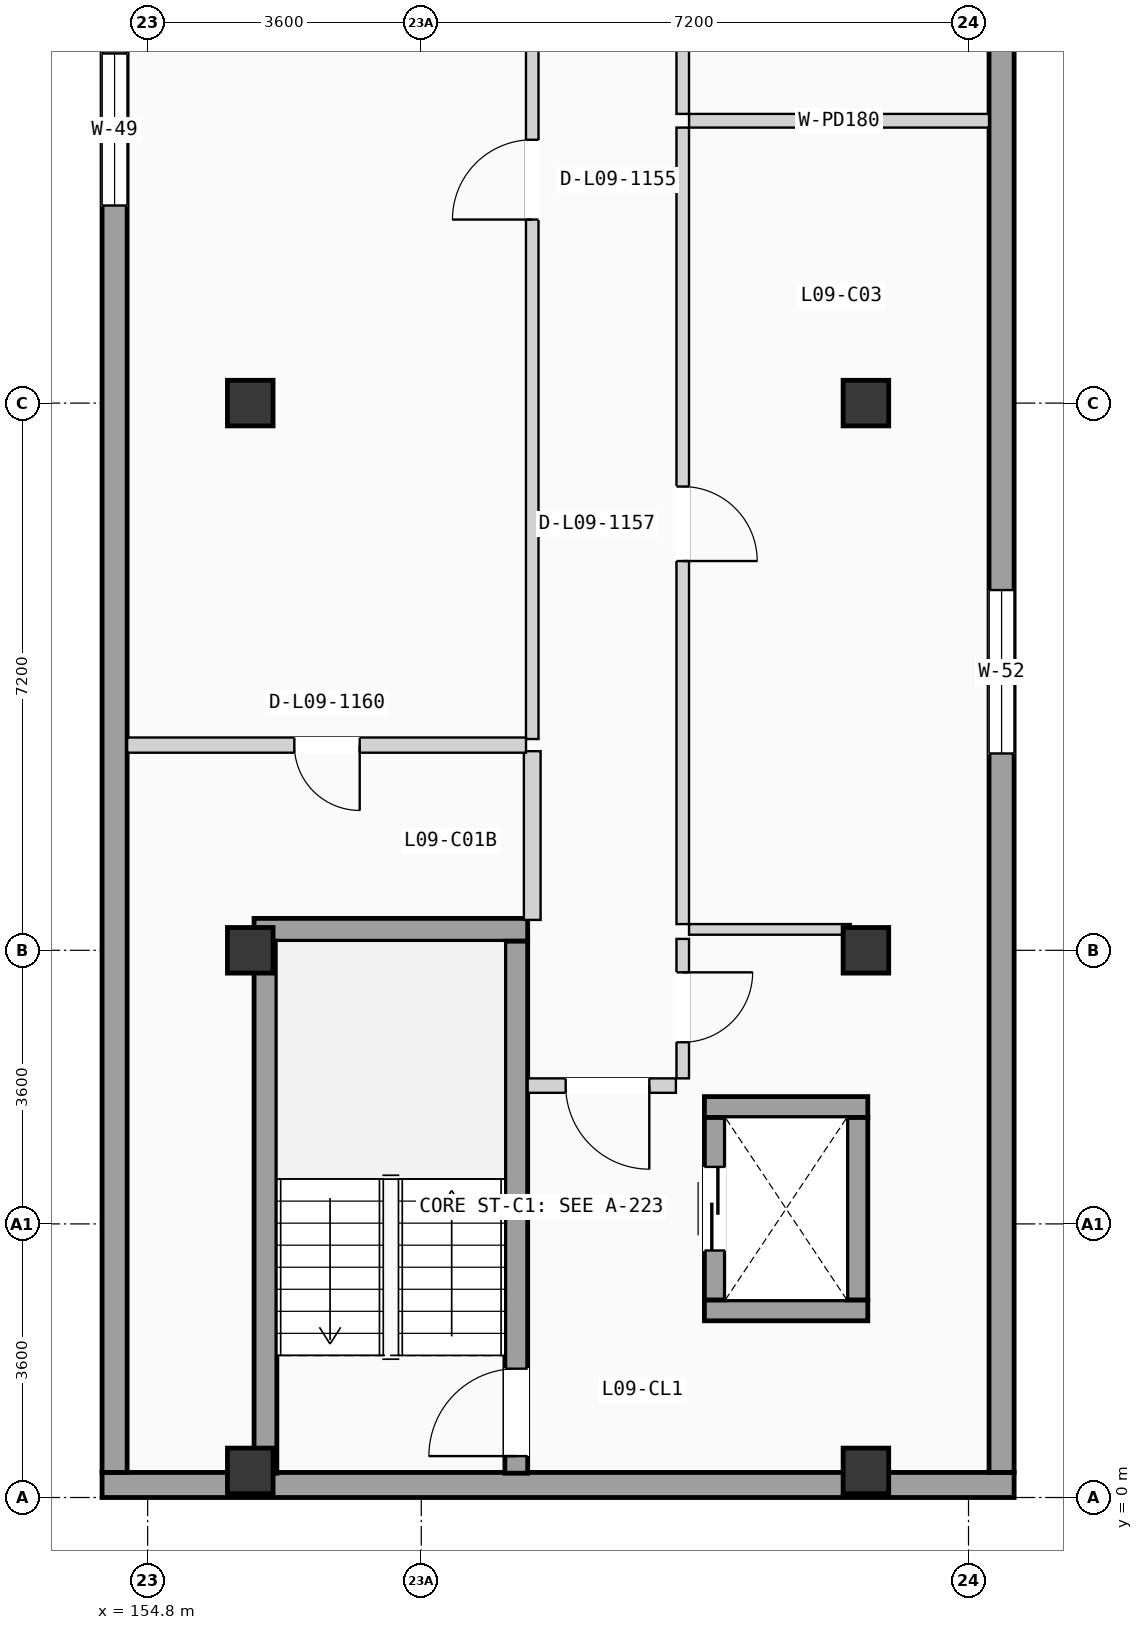
"""IFC4 building model, lengths in metres.
Left out: names, types, materials, properties, quantities, classifications, styles, units other than length and angle.
Written with IfcOpenShell. Run it as: python <this file> out.ifc"""

import sys

from ifc_helpers import new_model, si_unit, direction, frame, frame_2d, origin, origin_2d, place, context, subcontext, project, spatial, rectangle, extrude, element, fill, save


model = new_model("IFC4")
c1 = context("Model", 3, precision=1e-05, world=origin(), true_north=direction((0.0, 1.0)))
c2 = subcontext(c1, "Body", "Model", "MODEL_VIEW")
j1 = project(units=[si_unit("LENGTHUNIT", "METRE"), si_unit("PLANEANGLEUNIT", "RADIAN")], contexts=[c1])
p1 = place(None, origin())
s1 = spatial("IfcSite", under=j1, at=p1, CompositionType="ELEMENT")
p2 = place(p1, origin())
s2 = spatial("IfcBuilding", under=s1, at=p2, CompositionType="ELEMENT")
p3 = place(p2, frame((0.0, 0.0, 30.975)))
s3 = spatial("IfcBuildingStorey", under=s2, at=p3, CompositionType="ELEMENT", Elevation=30.975)
for number, where, z_axis, x_axis in (
    (1, (156.15, 0.35, 0.0), (0.0, 0.0, 1.0), (1.0, 0.0, 0.0)),
    (2, (156.15, 7.2, 0.0), (0.0, 0.0, 1.0), (1.0, 0.0, 0.0)),
    (3, (156.15, 14.4, 0.0), (0.0, 0.0, 1.0), (1.0, 0.0, 0.0)),
    (4, (164.25, 0.35, 0.0), (0.0, 0.0, 1.0), (1.0, 0.0, 0.0)),
    (5, (164.25, 7.2, 0.0), (0.0, 0.0, 1.0), (1.0, 0.0, 0.0)),
    (6, (164.25, 14.4, 0.0), (0.0, 0.0, 1.0), (1.0, 0.0, 0.0)),
):
    element("IfcColumn", number, at=place(p3, frame(where, z_axis=z_axis, x_axis=x_axis)), inside=s3, PredefinedType="COLUMN", context=c2, shape_type="SweptSolid", body=[
        extrude(rectangle(XDim=0.6, YDim=0.6, at=origin_2d()), origin(), (0.0, 0.0, 1.0), 3.15),
    ])
p4 = place(p3, frame((154.2, 0.165, 0.0), z_axis=(0.0, 0.0, 1.0), x_axis=(1.0, 0.0, 0.0)))
e7 = element("IfcWall", 7, at=p4, inside=s3, PredefinedType="SOLIDWALL", context=c2, shape_type="SweptSolid", body=[
    extrude(rectangle(XDim=12.0, YDim=0.33, at=frame_2d((6.0, 0.0))), origin(), (0.0, 0.0, 1.0), 2.9),
])
p5 = place(p3, frame((154.365, 0.33, 0.0), z_axis=(0.0, 0.0, 1.0), x_axis=(0.0, 1.0, 0.0)))
e8 = element("IfcWall", 8, at=p5, inside=s3, PredefinedType="SOLIDWALL", context=c2, shape_type="SweptSolid", body=[
    extrude(rectangle(XDim=49.74, YDim=0.33, at=frame_2d((24.87, 0.0))), origin(), (0.0, 0.0, 1.0), 2.9),
])
p6 = place(p5, frame((16.67, 0.0, 0.515)))
e9 = element("IfcOpeningElement", 9, at=p6, cuts=e8, PredefinedType="OPENING", context=c2, shape_type="SweptSolid", body=[
    extrude(rectangle(XDim=2.0, YDim=1.65, at=frame_2d((1.0, 0.825))), frame((0.0, 0.175, 0.0), z_axis=(0.0, -1.0, 0.0), x_axis=(1.0, 0.0, 0.0)), (0.0, 0.0, 1.0), 0.35),
])
p7 = place(p5, frame((25.89, 0.0, 0.85)))
e10 = element("IfcOpeningElement", 10, at=p7, cuts=e8, PredefinedType="OPENING", context=c2, shape_type="SweptSolid", body=[
    extrude(rectangle(XDim=0.95, YDim=1.2, at=frame_2d((0.475, 0.6))), frame((0.0, 0.175, 0.0), z_axis=(0.0, -1.0, 0.0), x_axis=(1.0, 0.0, 0.0)), (0.0, 0.0, 1.0), 0.35),
])
p8 = place(p5, frame((32.055, 0.0, 0.9)))
e11 = element("IfcOpeningElement", 11, at=p8, cuts=e8, PredefinedType="OPENING", context=c2, shape_type="SweptSolid", body=[
    extrude(rectangle(XDim=2.15, YDim=1.2, at=frame_2d((1.075, 0.6))), frame((0.0, 0.175, 0.0), z_axis=(0.0, -1.0, 0.0), x_axis=(1.0, 0.0, 0.0)), (0.0, 0.0, 1.0), 0.35),
])
p9 = place(p3, frame((166.035, 0.33, 0.0), z_axis=(0.0, 0.0, 1.0), x_axis=(0.0, 1.0, 0.0)))
e12 = element("IfcWall", 12, at=p9, inside=s3, PredefinedType="SOLIDWALL", context=c2, shape_type="SweptSolid", body=[
    extrude(rectangle(XDim=49.74, YDim=0.33, at=frame_2d((24.87, 0.0))), origin(), (0.0, 0.0, 1.0), 2.9),
])
p10 = place(p9, frame((9.46, 0.0, 0.815)))
e13 = element("IfcOpeningElement", 13, at=p10, cuts=e12, PredefinedType="OPENING", context=c2, shape_type="SweptSolid", body=[
    extrude(rectangle(XDim=2.15, YDim=1.35, at=frame_2d((1.075, 0.675))), frame((0.0, 0.175, 0.0), z_axis=(0.0, -1.0, 0.0), x_axis=(1.0, 0.0, 0.0)), (0.0, 0.0, 1.0), 0.35),
])
p11 = place(p9, frame((23.795, 0.0, 0.665)))
e14 = element("IfcOpeningElement", 14, at=p11, cuts=e12, PredefinedType="OPENING", context=c2, shape_type="SweptSolid", body=[
    extrude(rectangle(XDim=2.15, YDim=1.5, at=frame_2d((1.075, 0.75))), frame((0.0, 0.175, 0.0), z_axis=(0.0, -1.0, 0.0), x_axis=(1.0, 0.0, 0.0)), (0.0, 0.0, 1.0), 0.35),
])
p12 = place(p9, frame((32.055, 0.0, 0.515)))
e15 = element("IfcOpeningElement", 15, at=p12, cuts=e12, PredefinedType="OPENING", context=c2, shape_type="SweptSolid", body=[
    extrude(rectangle(XDim=2.15, YDim=1.65, at=frame_2d((1.075, 0.825))), frame((0.0, 0.175, 0.0), z_axis=(0.0, -1.0, 0.0), x_axis=(1.0, 0.0, 0.0)), (0.0, 0.0, 1.0), 0.35),
])
p13 = place(p3, frame((156.2, 7.47, 0.0), z_axis=(0.0, 0.0, 1.0), x_axis=(1.0, 0.0, 0.0)))
e16 = element("IfcWall", 16, at=p13, inside=s3, PredefinedType="SHEAR", context=c2, shape_type="SweptSolid", body=[
    extrude(rectangle(XDim=3.6, YDim=0.3, at=frame_2d((1.8, 0.0))), origin(), (0.0, 0.0, 1.0), 2.9),
])
p14 = place(p3, frame((156.35, 0.32, 0.0), z_axis=(0.0, 0.0, 1.0), x_axis=(0.0, 1.0, 0.0)))
e17 = element("IfcWall", 17, at=p14, inside=s3, PredefinedType="SHEAR", context=c2, shape_type="SweptSolid", body=[
    extrude(rectangle(XDim=7.0, YDim=0.3, at=frame_2d((3.5, 0.0))), origin(), (0.0, 0.0, 1.0), 2.9),
])
p15 = place(p3, frame((159.65, 0.32, 0.0), z_axis=(0.0, 0.0, 1.0), x_axis=(0.0, 1.0, 0.0)))
e18 = element("IfcWall", 18, at=p15, inside=s3, PredefinedType="SHEAR", context=c2, shape_type="SweptSolid", body=[
    extrude(rectangle(XDim=7.0, YDim=0.3, at=frame_2d((3.5, 0.0))), origin(), (0.0, 0.0, 1.0), 2.9),
])
p16 = place(p15, frame((0.225, 0.0, 0.0)))
e19 = element("IfcOpeningElement", 19, at=p16, cuts=e18, PredefinedType="OPENING", context=c2, shape_type="SweptSolid", body=[
    extrude(rectangle(XDim=1.15, YDim=2.12, at=frame_2d((0.575, 1.06))), frame((0.0, 0.16, 0.0), z_axis=(0.0, -1.0, 0.0), x_axis=(1.0, 0.0, 0.0)), (0.0, 0.0, 1.0), 0.32),
])
for number, where, z_axis, x_axis in (
    (20, (162.125, 2.462, 0.0), (0.0, 0.0, 1.0), (1.0, 0.0, 0.0)),
    (21, (162.125, 5.137, 0.0), (0.0, 0.0, 1.0), (1.0, 0.0, 0.0)),
):
    element("IfcWall", number, at=place(p3, frame(where, z_axis=z_axis, x_axis=x_axis)), inside=s3, PredefinedType="SHEAR", context=c2, shape_type="SweptSolid", body=[
        extrude(rectangle(XDim=2.15, YDim=0.275, at=frame_2d((1.075, 0.0))), origin(), (0.0, 0.0, 1.0), 2.9),
    ])
p17 = place(p3, frame((162.262, 2.6, 0.0), z_axis=(0.0, 0.0, 1.0), x_axis=(0.0, 1.0, 0.0)))
e22 = element("IfcWall", 22, at=p17, inside=s3, PredefinedType="SHEAR", context=c2, shape_type="SweptSolid", body=[
    extrude(rectangle(XDim=2.4, YDim=0.275, at=frame_2d((1.2, 0.0))), origin(), (0.0, 0.0, 1.0), 2.9),
])
p18 = place(p17, frame((0.65, 0.0, 0.0)))
e23 = element("IfcOpeningElement", 23, at=p18, cuts=e22, PredefinedType="OPENING", context=c2, shape_type="SweptSolid", body=[
    extrude(rectangle(XDim=1.1, YDim=2.15, at=frame_2d((0.55, 1.075))), frame((0.0, 0.147, 0.0), z_axis=(0.0, -1.0, 0.0), x_axis=(1.0, 0.0, 0.0)), (0.0, 0.0, 1.0), 0.295),
])
p19 = place(p3, frame((164.137, 2.6, 0.0), z_axis=(0.0, 0.0, 1.0), x_axis=(0.0, 1.0, 0.0)))
e24 = element("IfcWall", 24, at=p19, inside=s3, PredefinedType="SHEAR", context=c2, shape_type="SweptSolid", body=[
    extrude(rectangle(XDim=2.4, YDim=0.275, at=frame_2d((1.2, 0.0))), origin(), (0.0, 0.0, 1.0), 2.9),
])
p20 = place(p3, frame((159.8, 5.42, 0.0), z_axis=(0.0, 0.0, 1.0), x_axis=(1.0, 0.0, 0.0)))
e25 = element("IfcWall", 25, at=p20, inside=s3, PredefinedType="PARTITIONING", context=c2, shape_type="SweptSolid", body=[
    extrude(rectangle(XDim=1.95, YDim=0.19, at=frame_2d((0.975, 0.0))), origin(), (0.0, 0.0, 1.0), 2.87),
])
p21 = place(p20, frame((0.5, 0.0, 0.0)))
e26 = element("IfcOpeningElement", 26, at=p21, cuts=e25, PredefinedType="OPENING", context=c2, shape_type="SweptSolid", body=[
    extrude(rectangle(XDim=1.1, YDim=2.12, at=frame_2d((0.55, 1.06))), frame((0.0, 0.105, 0.0), z_axis=(0.0, -1.0, 0.0), x_axis=(1.0, 0.0, 0.0)), (0.0, 0.0, 1.0), 0.21),
])
p22 = place(p3, frame((161.84, 5.515, 0.0), z_axis=(0.0, 0.0, 1.0), x_axis=(0.0, 1.0, 0.0)))
e27 = element("IfcWall", 27, at=p22, inside=s3, PredefinedType="PARTITIONING", context=c2, shape_type="SweptSolid", body=[
    extrude(rectangle(XDim=1.835, YDim=0.165, at=frame_2d((0.917, 0.0))), origin(), (0.0, 0.0, 1.0), 2.87),
])
p23 = place(p22, frame((0.475, 0.0, 0.0)))
e28 = element("IfcOpeningElement", 28, at=p23, cuts=e27, PredefinedType="OPENING", context=c2, shape_type="SweptSolid", body=[
    extrude(rectangle(XDim=0.92, YDim=2.04, at=frame_2d((0.46, 1.02))), frame((0.0, 0.093, 0.0), z_axis=(0.0, -1.0, 0.0), x_axis=(1.0, 0.0, 0.0)), (0.0, 0.0, 1.0), 0.185),
])
p24 = place(p3, frame((161.923, 7.475, 0.0), z_axis=(0.0, 0.0, 1.0), x_axis=(1.0, 0.0, 0.0)))
e29 = element("IfcWall", 29, at=p24, inside=s3, PredefinedType="PARTITIONING", context=c2, shape_type="SweptSolid", body=[
    extrude(rectangle(XDim=2.127, YDim=0.14, at=frame_2d((1.063, 0.0))), origin(), (0.0, 0.0, 1.0), 2.87),
])
p25 = place(p3, frame((159.86, 7.6, 0.0), z_axis=(0.0, 0.0, 1.0), x_axis=(0.0, 1.0, 0.0)))
e30 = element("IfcWall", 30, at=p25, inside=s3, PredefinedType="PLUMBINGWALL", context=c2, shape_type="SweptSolid", body=[
    extrude(rectangle(XDim=2.22, YDim=0.22, at=frame_2d((1.11, 0.0))), origin(), (0.0, 0.0, 1.0), 2.87),
])
p26 = place(p3, frame((159.86, 9.98, 0.0), z_axis=(0.0, 0.0, 1.0), x_axis=(0.0, 1.0, 0.0)))
e31 = element("IfcWall", 31, at=p26, inside=s3, PredefinedType="PARTITIONING", context=c2, shape_type="SweptSolid", body=[
    extrude(rectangle(XDim=14.72, YDim=0.165, at=frame_2d((7.36, 0.0))), origin(), (0.0, 0.0, 1.0), 2.87),
])
p27 = place(p26, frame((6.835, 0.0, 0.0)))
e32 = element("IfcOpeningElement", 32, at=p27, cuts=e31, PredefinedType="OPENING", context=c2, shape_type="SweptSolid", body=[
    extrude(rectangle(XDim=1.05, YDim=2.13, at=frame_2d((0.525, 1.065))), frame((0.0, 0.093, 0.0), z_axis=(0.0, -1.0, 0.0), x_axis=(1.0, 0.0, 0.0)), (0.0, 0.0, 1.0), 0.185),
])
p28 = place(p3, frame((161.84, 7.545, 0.0), z_axis=(0.0, 0.0, 1.0), x_axis=(0.0, 1.0, 0.0)))
e33 = element("IfcWall", 33, at=p28, inside=s3, PredefinedType="PARTITIONING", context=c2, shape_type="SweptSolid", body=[
    extrude(rectangle(XDim=10.48, YDim=0.165, at=frame_2d((5.24, 0.0))), origin(), (0.0, 0.0, 1.0), 2.87),
])
p29 = place(p28, frame((4.777, 0.0, 0.0)))
e34 = element("IfcOpeningElement", 34, at=p29, cuts=e33, PredefinedType="OPENING", context=c2, shape_type="SweptSolid", body=[
    extrude(rectangle(XDim=0.98, YDim=2.08, at=frame_2d((0.49, 1.04))), frame((0.0, 0.093, 0.0), z_axis=(0.0, -1.0, 0.0), x_axis=(1.0, 0.0, 0.0)), (0.0, 0.0, 1.0), 0.185),
])
p30 = place(p3, frame((161.84, 18.205, 0.0), z_axis=(0.0, 0.0, 1.0), x_axis=(0.0, 1.0, 0.0)))
e35 = element("IfcWall", 35, at=p30, inside=s3, PredefinedType="PARTITIONING", context=c2, shape_type="SweptSolid", body=[
    extrude(rectangle(XDim=10.425, YDim=0.165, at=frame_2d((5.212, 0.0))), origin(), (0.0, 0.0, 1.0), 2.87),
])
p31 = place(p30, frame((4.722, 0.0, 0.0)))
e36 = element("IfcOpeningElement", 36, at=p31, cuts=e35, PredefinedType="OPENING", context=c2, shape_type="SweptSolid", body=[
    extrude(rectangle(XDim=0.98, YDim=2.08, at=frame_2d((0.49, 1.04))), frame((0.0, 0.093, 0.0), z_axis=(0.0, -1.0, 0.0), x_axis=(1.0, 0.0, 0.0)), (0.0, 0.0, 1.0), 0.185),
])
p32 = place(p3, frame((154.53, 9.9, 0.0), z_axis=(0.0, 0.0, 1.0), x_axis=(1.0, 0.0, 0.0)))
e37 = element("IfcWall", 37, at=p32, inside=s3, PredefinedType="PLUMBINGWALL", context=c2, shape_type="SweptSolid", body=[
    extrude(rectangle(XDim=5.248, YDim=0.2, at=frame_2d((2.624, 0.0))), origin(), (0.0, 0.0, 1.0), 2.87),
])
p33 = place(p32, frame((2.2, 0.0, 0.0)))
e38 = element("IfcOpeningElement", 38, at=p33, cuts=e37, PredefinedType="OPENING", context=c2, shape_type="SweptSolid", body=[
    extrude(rectangle(XDim=0.86, YDim=2.0, at=frame_2d((0.43, 1.0))), frame((0.0, 0.11, 0.0), z_axis=(0.0, -1.0, 0.0), x_axis=(1.0, 0.0, 0.0)), (0.0, 0.0, 1.0), 0.22),
])
p34 = place(p3, frame((161.923, 18.115, 0.0), z_axis=(0.0, 0.0, 1.0), x_axis=(1.0, 0.0, 0.0)))
e39 = element("IfcWall", 39, at=p34, inside=s3, PredefinedType="PARTITIONING", context=c2, shape_type="SweptSolid", body=[
    extrude(rectangle(XDim=3.947, YDim=0.18, at=frame_2d((1.974, 0.0))), origin(), (0.0, 0.0, 1.0), 2.87),
])
p35 = place(p6, origin())
e40 = element("IfcWindow", 40, at=p35, inside=s3, PartitioningType="DOUBLE_PANEL_VERTICAL", PredefinedType="WINDOW", context=c2, shape_type="SweptSolid", body=[
    extrude(rectangle(XDim=2.0, YDim=1.65, at=frame_2d((1.0, 0.825))), frame((0.0, 0.03, 0.0), z_axis=(0.0, -1.0, 0.0), x_axis=(1.0, 0.0, 0.0)), (0.0, 0.0, 1.0), 0.06),
])
fill(e9, e40)
p36 = place(p10, origin())
e41 = element("IfcWindow", 41, at=p36, inside=s3, PartitioningType="DOUBLE_PANEL_VERTICAL", PredefinedType="WINDOW", context=c2, shape_type="SweptSolid", body=[
    extrude(rectangle(XDim=2.15, YDim=1.35, at=frame_2d((1.075, 0.675))), frame((0.0, 0.03, 0.0), z_axis=(0.0, -1.0, 0.0), x_axis=(1.0, 0.0, 0.0)), (0.0, 0.0, 1.0), 0.06),
])
fill(e13, e41)
p37 = place(p16, origin())
e42 = element("IfcDoor", 42, at=p37, inside=s3, OperationType="SINGLE_SWING_LEFT", PredefinedType="DOOR", context=c2, shape_type="SweptSolid", body=[
    extrude(rectangle(XDim=1.15, YDim=2.12, at=frame_2d((0.575, 1.06))), frame((0.0, 0.025, 0.0), z_axis=(0.0, -1.0, 0.0), x_axis=(1.0, 0.0, 0.0)), (0.0, 0.0, 1.0), 0.05),
])
fill(e19, e42)
p38 = place(p18, origin())
e43 = element("IfcDoor", 43, at=p38, inside=s3, OperationType="SLIDING_TO_LEFT", PredefinedType="DOOR", context=c2, shape_type="SweptSolid", body=[
    extrude(rectangle(XDim=1.1, YDim=2.15, at=frame_2d((0.55, 1.075))), frame((0.0, 0.025, 0.0), z_axis=(0.0, -1.0, 0.0), x_axis=(1.0, 0.0, 0.0)), (0.0, 0.0, 1.0), 0.05),
])
fill(e23, e43)
p39 = place(p21, frame((1.1, 0.0, 0.0), z_axis=(0.0, 0.0, 1.0), x_axis=(-1.0, 0.0, 0.0)))
e44 = element("IfcDoor", 44, at=p39, inside=s3, OperationType="SINGLE_SWING_RIGHT", PredefinedType="DOOR", context=c2, shape_type="SweptSolid", body=[
    extrude(rectangle(XDim=1.1, YDim=2.12, at=frame_2d((0.55, 1.06))), frame((0.0, 0.025, 0.0), z_axis=(0.0, -1.0, 0.0), x_axis=(1.0, 0.0, 0.0)), (0.0, 0.0, 1.0), 0.05),
])
fill(e26, e44)
p40 = place(p23, frame((0.92, 0.0, 0.0), z_axis=(0.0, 0.0, 1.0), x_axis=(-1.0, 0.0, 0.0)))
e45 = element("IfcDoor", 45, at=p40, inside=s3, OperationType="SINGLE_SWING_RIGHT", PredefinedType="DOOR", context=c2, shape_type="SweptSolid", body=[
    extrude(rectangle(XDim=0.92, YDim=2.04, at=frame_2d((0.46, 1.02))), frame((0.0, 0.025, 0.0), z_axis=(0.0, -1.0, 0.0), x_axis=(1.0, 0.0, 0.0)), (0.0, 0.0, 1.0), 0.05),
])
fill(e28, e45)
p41 = place(p27, origin())
e46 = element("IfcDoor", 46, at=p41, inside=s3, OperationType="SINGLE_SWING_LEFT", PredefinedType="DOOR", context=c2, shape_type="SweptSolid", body=[
    extrude(rectangle(XDim=1.05, YDim=2.13, at=frame_2d((0.525, 1.065))), frame((0.0, 0.025, 0.0), z_axis=(0.0, -1.0, 0.0), x_axis=(1.0, 0.0, 0.0)), (0.0, 0.0, 1.0), 0.05),
])
fill(e32, e46)
p42 = place(p29, frame((0.98, 0.0, 0.0), z_axis=(0.0, 0.0, 1.0), x_axis=(-1.0, 0.0, 0.0)))
e47 = element("IfcDoor", 47, at=p42, inside=s3, OperationType="SINGLE_SWING_LEFT", PredefinedType="DOOR", context=c2, shape_type="SweptSolid", body=[
    extrude(rectangle(XDim=0.98, YDim=2.08, at=frame_2d((0.49, 1.04))), frame((0.0, 0.025, 0.0), z_axis=(0.0, -1.0, 0.0), x_axis=(1.0, 0.0, 0.0)), (0.0, 0.0, 1.0), 0.05),
])
fill(e34, e47)
p43 = place(p33, frame((0.86, 0.0, 0.0), z_axis=(0.0, 0.0, 1.0), x_axis=(-1.0, 0.0, 0.0)))
e48 = element("IfcDoor", 48, at=p43, inside=s3, OperationType="SINGLE_SWING_RIGHT", PredefinedType="DOOR", context=c2, shape_type="SweptSolid", body=[
    extrude(rectangle(XDim=0.86, YDim=2.0, at=frame_2d((0.43, 1.0))), frame((0.0, 0.025, 0.0), z_axis=(0.0, -1.0, 0.0), x_axis=(1.0, 0.0, 0.0)), (0.0, 0.0, 1.0), 0.05),
])
fill(e38, e48)
save(model, sys.argv[1])
